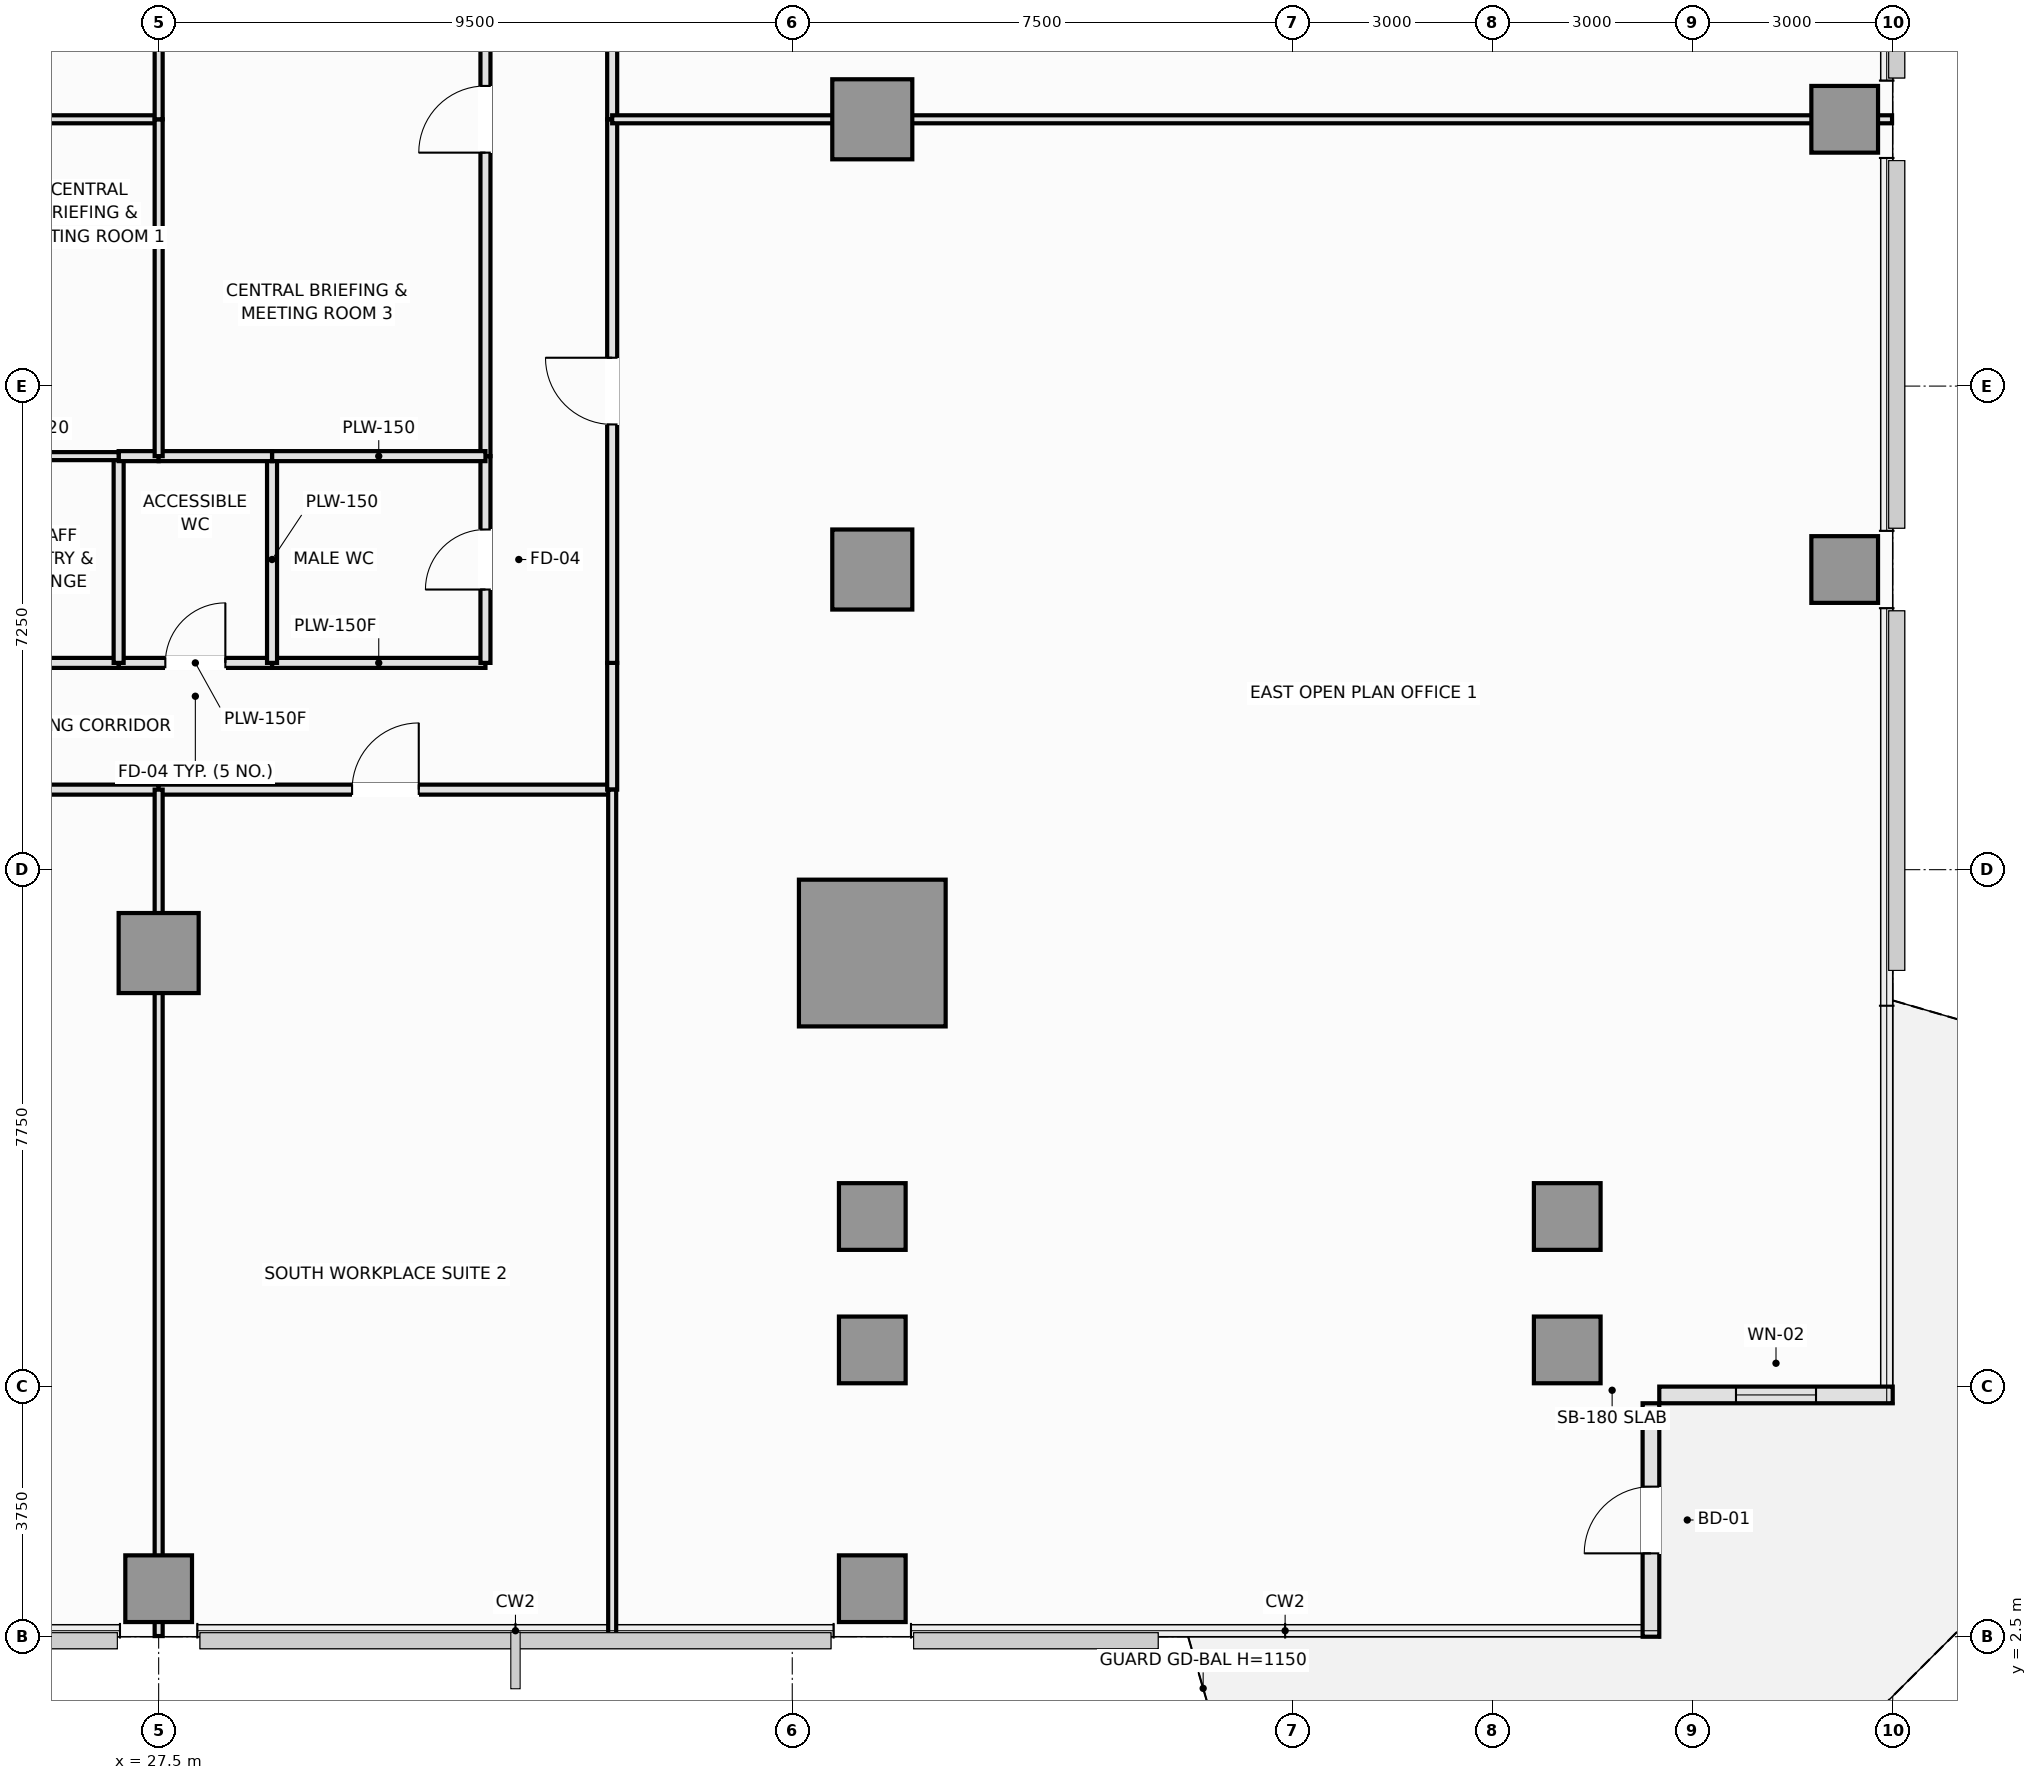
"""IFC4 building model, lengths in metres.
Left out: names, types, materials, properties, quantities, classifications, styles, units other than length and angle.
Written with IfcOpenShell. Run it as: python <this file> out.ifc"""

import sys

from ifc_helpers import new_model, si_unit, direction, frame, frame_2d, origin, origin_2d, place, context, subcontext, project, spatial, rectangle, extrude, element, fill, save


model = new_model("IFC4")
c1 = context("Model", 3, precision=1e-05, world=origin(), true_north=direction((0.0, 1.0)))
c2 = subcontext(c1, "Body", "Model", "MODEL_VIEW")
j1 = project(units=[si_unit("LENGTHUNIT", "METRE"), si_unit("PLANEANGLEUNIT", "RADIAN")], contexts=[c1])
p1 = place(None, origin())
s1 = spatial("IfcSite", under=j1, at=p1, CompositionType="ELEMENT")
p2 = place(p1, origin())
s2 = spatial("IfcBuilding", under=s1, at=p2, CompositionType="ELEMENT")
p3 = place(p2, frame((0.0, 0.0, 36.25)))
s3 = spatial("IfcBuildingStorey", under=s2, at=p3, CompositionType="ELEMENT", Elevation=36.25)
p4 = place(p3, frame((38.2, 12.75, 0.0), z_axis=(0.0, 0.0, 1.0), x_axis=(1.0, 0.0, 0.0)))
e1 = element("IfcColumn", 1, at=p4, inside=s3, PredefinedType="COLUMN", context=c2, shape_type="SweptSolid", body=[
    extrude(rectangle(XDim=2.2, YDim=2.2, at=origin_2d()), origin(), (0.0, 0.0, 1.0), 3.55),
])
for number, where, z_axis, x_axis in (
    (2, (27.5, 12.75, 0.0), (0.0, 0.0, 1.0), (1.0, 0.0, 0.0)),
    (3, (38.2, 18.5, 0.0), (0.0, 0.0, 1.0), (1.0, 0.0, 0.0)),
    (4, (38.2, 25.25, 0.0), (0.0, 0.0, 1.0), (1.0, 0.0, 0.0)),
):
    element("IfcColumn", number, at=place(p3, frame(where, z_axis=z_axis, x_axis=x_axis)), inside=s3, PredefinedType="COLUMN", context=c2, shape_type="SweptSolid", body=[
        extrude(rectangle(XDim=1.2, YDim=1.2, at=origin_2d()), origin(), (0.0, 0.0, 1.0), 3.55),
    ])
for number, where, z_axis, x_axis in (
    (5, (48.62, 6.8, 0.0), (0.0, 0.0, 1.0), (1.0, 0.0, 0.0)),
    (6, (38.2, 6.8, 0.0), (0.0, 0.0, 1.0), (1.0, 0.0, 0.0)),
    (7, (38.2, 8.8, 0.0), (0.0, 0.0, 1.0), (1.0, 0.0, 0.0)),
    (8, (48.62, 8.8, 0.0), (0.0, 0.0, 1.0), (1.0, 0.0, 0.0)),
    (9, (52.78, 18.5, 0.0), (0.0, 0.0, 1.0), (1.0, 0.0, 0.0)),
    (10, (52.78, 25.25, 0.0), (0.0, 0.0, 1.0), (1.0, 0.0, 0.0)),
    (11, (27.5, 3.22, 0.0), (0.0, 0.0, 1.0), (1.0, 0.0, 0.0)),
    (12, (38.2, 3.22, 0.0), (0.0, 0.0, 1.0), (1.0, 0.0, 0.0)),
):
    element("IfcColumn", number, at=place(p3, frame(where, z_axis=z_axis, x_axis=x_axis)), inside=s3, PredefinedType="COLUMN", context=c2, shape_type="SweptSolid", body=[
        extrude(rectangle(XDim=1.0, YDim=1.0, at=origin_2d()), origin(), (0.0, 0.0, 1.0), 3.55),
    ])
p5 = place(p3, frame((49.875, 2.5, 0.0), z_axis=(0.0, 0.0, 1.0), x_axis=(0.0, 1.0, 0.0)))
e13 = element("IfcWall", 13, at=p5, inside=s3, PredefinedType="SOLIDWALL", context=c2, shape_type="SweptSolid", body=[
    extrude(rectangle(XDim=3.5, YDim=0.25, at=frame_2d((1.75, 0.0))), origin(), (0.0, 0.0, 1.0), 3.07),
])
p6 = place(p5, frame((1.25, 0.0, 0.0)))
e14 = element("IfcOpeningElement", 14, at=p6, cuts=e13, PredefinedType="OPENING", context=c2, shape_type="SweptSolid", body=[
    extrude(rectangle(XDim=1.0, YDim=2.2, at=frame_2d((0.5, 1.1))), frame((0.0, 0.135, 0.0), z_axis=(0.0, -1.0, 0.0), x_axis=(1.0, 0.0, 0.0)), (0.0, 0.0, 1.0), 0.27),
])
p7 = place(p3, frame((50.0, 6.125, 0.0), z_axis=(0.0, 0.0, 1.0), x_axis=(1.0, 0.0, 0.0)))
e15 = element("IfcWall", 15, at=p7, inside=s3, PredefinedType="SOLIDWALL", context=c2, shape_type="SweptSolid", body=[
    extrude(rectangle(XDim=3.5, YDim=0.25, at=frame_2d((1.75, 0.0))), origin(), (0.0, 0.0, 1.0), 3.07),
])
p8 = place(p7, frame((1.15, 0.0, 0.9)))
e16 = element("IfcOpeningElement", 16, at=p8, cuts=e15, PredefinedType="OPENING", context=c2, shape_type="SweptSolid", body=[
    extrude(rectangle(XDim=1.2, YDim=1.8, at=frame_2d((0.6, 0.9))), frame((0.0, 0.135, 0.0), z_axis=(0.0, -1.0, 0.0), x_axis=(1.0, 0.0, 0.0)), (0.0, 0.0, 1.0), 0.27),
])
p9 = place(p3, frame((29.2, 17.1, 0.0), z_axis=(0.0, 0.0, 1.0), x_axis=(1.0, 0.0, 0.0)))
e17 = element("IfcWall", 17, at=p9, inside=s3, PredefinedType="PLUMBINGWALL", context=c2, shape_type="SweptSolid", body=[
    extrude(rectangle(XDim=3.2, YDim=0.15, at=frame_2d((1.6, 0.0))), origin(), (0.0, 0.0, 1.0), 3.37),
])
p10 = place(p3, frame((26.9, 17.1, 0.0), z_axis=(0.0, 0.0, 1.0), x_axis=(1.0, 0.0, 0.0)))
e18 = element("IfcWall", 18, at=p10, inside=s3, PredefinedType="PLUMBINGWALL", context=c2, shape_type="SweptSolid", body=[
    extrude(rectangle(XDim=2.3, YDim=0.15, at=frame_2d((1.15, 0.0))), origin(), (0.0, 0.0, 1.0), 3.37),
])
p11 = place(p10, frame((0.7, 0.0, 0.0)))
e19 = element("IfcOpeningElement", 19, at=p11, cuts=e18, PredefinedType="OPENING", context=c2, shape_type="SweptSolid", body=[
    extrude(rectangle(XDim=0.9, YDim=2.1, at=frame_2d((0.45, 1.05))), frame((0.0, 0.085, 0.0), z_axis=(0.0, -1.0, 0.0), x_axis=(1.0, 0.0, 0.0)), (0.0, 0.0, 1.0), 0.17),
])
p12 = place(p3, frame((24.45, 17.1, 0.0), z_axis=(0.0, 0.0, 1.0), x_axis=(1.0, 0.0, 0.0)))
e20 = element("IfcWall", 20, at=p12, inside=s3, PredefinedType="PARTITIONING", context=c2, shape_type="SweptSolid", body=[
    extrude(rectangle(XDim=2.45, YDim=0.15, at=frame_2d((1.225, 0.0))), origin(), (0.0, 0.0, 1.0), 3.37),
])
p13 = place(p3, frame((18.0, 15.2, 0.0), z_axis=(0.0, 0.0, 1.0), x_axis=(1.0, 0.0, 0.0)))
e21 = element("IfcWall", 21, at=p13, inside=s3, PredefinedType="PARTITIONING", context=c2, shape_type="SweptSolid", body=[
    extrude(rectangle(XDim=9.5, YDim=0.15, at=frame_2d((4.75, 0.0))), origin(), (0.0, 0.0, 1.0), 3.37),
])
p14 = place(p13, frame((4.25, 0.0, 0.0)))
e22 = element("IfcOpeningElement", 22, at=p14, cuts=e21, PredefinedType="OPENING", context=c2, shape_type="SweptSolid", body=[
    extrude(rectangle(XDim=1.0, YDim=2.15, at=frame_2d((0.5, 1.075))), frame((0.0, 0.085, 0.0), z_axis=(0.0, -1.0, 0.0), x_axis=(1.0, 0.0, 0.0)), (0.0, 0.0, 1.0), 0.17),
])
p15 = place(p3, frame((27.5, 15.2, 0.0), z_axis=(0.0, 0.0, 1.0), x_axis=(1.0, 0.0, 0.0)))
e23 = element("IfcWall", 23, at=p15, inside=s3, PredefinedType="PARTITIONING", context=c2, shape_type="SweptSolid", body=[
    extrude(rectangle(XDim=6.8, YDim=0.15, at=frame_2d((3.4, 0.0))), origin(), (0.0, 0.0, 1.0), 3.37),
])
p16 = place(p15, frame((2.9, 0.0, 0.0)))
e24 = element("IfcOpeningElement", 24, at=p16, cuts=e23, PredefinedType="OPENING", context=c2, shape_type="SweptSolid", body=[
    extrude(rectangle(XDim=1.0, YDim=2.15, at=frame_2d((0.5, 1.075))), frame((0.0, 0.085, 0.0), z_axis=(0.0, -1.0, 0.0), x_axis=(1.0, 0.0, 0.0)), (0.0, 0.0, 1.0), 0.17),
])
p17 = place(p3, frame((34.3, 15.2, 0.0), z_axis=(0.0, 0.0, 1.0), x_axis=(0.0, 1.0, 0.0)))
e25 = element("IfcWall", 25, at=p17, inside=s3, PredefinedType="PARTITIONING", context=c2, shape_type="SweptSolid", body=[
    extrude(rectangle(XDim=1.9, YDim=0.15, at=frame_2d((0.95, 0.0))), origin(), (0.0, 0.0, 1.0), 3.37),
])
p18 = place(p3, frame((32.4, 17.1, 0.0), z_axis=(0.0, 0.0, 1.0), x_axis=(0.0, 1.0, 0.0)))
e26 = element("IfcWall", 26, at=p18, inside=s3, PredefinedType="PLUMBINGWALL", context=c2, shape_type="SweptSolid", body=[
    extrude(rectangle(XDim=3.1, YDim=0.15, at=frame_2d((1.55, 0.0))), origin(), (0.0, 0.0, 1.0), 3.37),
])
p19 = place(p18, frame((1.1, 0.0, 0.0)))
e27 = element("IfcOpeningElement", 27, at=p19, cuts=e26, PredefinedType="OPENING", context=c2, shape_type="SweptSolid", body=[
    extrude(rectangle(XDim=0.9, YDim=2.1, at=frame_2d((0.45, 1.05))), frame((0.0, 0.085, 0.0), z_axis=(0.0, -1.0, 0.0), x_axis=(1.0, 0.0, 0.0)), (0.0, 0.0, 1.0), 0.17),
])
p20 = place(p3, frame((32.4, 20.2, 0.0), z_axis=(0.0, 0.0, 1.0), x_axis=(0.0, 1.0, 0.0)))
e28 = element("IfcWall", 28, at=p20, inside=s3, PredefinedType="PARTITIONING", context=c2, shape_type="SweptSolid", body=[
    extrude(rectangle(XDim=10.1, YDim=0.15, at=frame_2d((5.05, 0.0))), origin(), (0.0, 0.0, 1.0), 3.37),
])
p21 = place(p20, frame((4.55, 0.0, 0.0)))
e29 = element("IfcOpeningElement", 29, at=p21, cuts=e28, PredefinedType="OPENING", context=c2, shape_type="SweptSolid", body=[
    extrude(rectangle(XDim=1.0, YDim=2.15, at=frame_2d((0.5, 1.075))), frame((0.0, 0.085, 0.0), z_axis=(0.0, -1.0, 0.0), x_axis=(1.0, 0.0, 0.0)), (0.0, 0.0, 1.0), 0.17),
])
p22 = place(p3, frame((34.3, 17.1, 0.0), z_axis=(0.0, 0.0, 1.0), x_axis=(0.0, 1.0, 0.0)))
e30 = element("IfcWall", 30, at=p22, inside=s3, PredefinedType="PARTITIONING", context=c2, shape_type="SweptSolid", body=[
    extrude(rectangle(XDim=8.15, YDim=0.15, at=frame_2d((4.075, 0.0))), origin(), (0.0, 0.0, 1.0), 3.37),
])
p23 = place(p22, frame((3.575, 0.0, 0.0)))
e31 = element("IfcOpeningElement", 31, at=p23, cuts=e30, PredefinedType="OPENING", context=c2, shape_type="SweptSolid", body=[
    extrude(rectangle(XDim=1.0, YDim=2.15, at=frame_2d((0.5, 1.075))), frame((0.0, 0.085, 0.0), z_axis=(0.0, -1.0, 0.0), x_axis=(1.0, 0.0, 0.0)), (0.0, 0.0, 1.0), 0.17),
])
p24 = place(p3, frame((34.3, 25.25, 0.0), z_axis=(0.0, 0.0, 1.0), x_axis=(0.0, 1.0, 0.0)))
e32 = element("IfcWall", 32, at=p24, inside=s3, PredefinedType="PARTITIONING", context=c2, shape_type="SweptSolid", body=[
    extrude(rectangle(XDim=8.15, YDim=0.15, at=frame_2d((4.075, 0.0))), origin(), (0.0, 0.0, 1.0), 3.37),
])
p25 = place(p24, frame((3.575, 0.0, 0.0)))
e33 = element("IfcOpeningElement", 33, at=p25, cuts=e32, PredefinedType="OPENING", context=c2, shape_type="SweptSolid", body=[
    extrude(rectangle(XDim=1.0, YDim=2.15, at=frame_2d((0.5, 1.075))), frame((0.0, 0.085, 0.0), z_axis=(0.0, -1.0, 0.0), x_axis=(1.0, 0.0, 0.0)), (0.0, 0.0, 1.0), 0.17),
])
p26 = place(p3, frame((29.2, 17.1, 0.0), z_axis=(0.0, 0.0, 1.0), x_axis=(0.0, 1.0, 0.0)))
e34 = element("IfcWall", 34, at=p26, inside=s3, PredefinedType="PLUMBINGWALL", context=c2, shape_type="SweptSolid", body=[
    extrude(rectangle(XDim=3.1, YDim=0.15, at=frame_2d((1.55, 0.0))), origin(), (0.0, 0.0, 1.0), 3.37),
])
p27 = place(p3, frame((29.2, 20.2, 0.0), z_axis=(0.0, 0.0, 1.0), x_axis=(1.0, 0.0, 0.0)))
e35 = element("IfcWall", 35, at=p27, inside=s3, PredefinedType="PLUMBINGWALL", context=c2, shape_type="SweptSolid", body=[
    extrude(rectangle(XDim=3.2, YDim=0.15, at=frame_2d((1.6, 0.0))), origin(), (0.0, 0.0, 1.0), 3.37),
])
p28 = place(p3, frame((26.9, 17.1, 0.0), z_axis=(0.0, 0.0, 1.0), x_axis=(0.0, 1.0, 0.0)))
e36 = element("IfcWall", 36, at=p28, inside=s3, PredefinedType="PLUMBINGWALL", context=c2, shape_type="SweptSolid", body=[
    extrude(rectangle(XDim=3.1, YDim=0.15, at=frame_2d((1.55, 0.0))), origin(), (0.0, 0.0, 1.0), 3.37),
])
p29 = place(p3, frame((26.9, 20.2, 0.0), z_axis=(0.0, 0.0, 1.0), x_axis=(1.0, 0.0, 0.0)))
e37 = element("IfcWall", 37, at=p29, inside=s3, PredefinedType="PLUMBINGWALL", context=c2, shape_type="SweptSolid", body=[
    extrude(rectangle(XDim=0.6, YDim=0.15, at=frame_2d((0.3, 0.0))), origin(), (0.0, 0.0, 1.0), 3.37),
])
p30 = place(p3, frame((27.5, 20.2, 0.0), z_axis=(0.0, 0.0, 1.0), x_axis=(1.0, 0.0, 0.0)))
e38 = element("IfcWall", 38, at=p30, inside=s3, PredefinedType="PLUMBINGWALL", context=c2, shape_type="SweptSolid", body=[
    extrude(rectangle(XDim=1.7, YDim=0.15, at=frame_2d((0.85, 0.0))), origin(), (0.0, 0.0, 1.0), 3.37),
])
p31 = place(p3, frame((24.45, 20.2, 0.0), z_axis=(0.0, 0.0, 1.0), x_axis=(1.0, 0.0, 0.0)))
e39 = element("IfcWall", 39, at=p31, inside=s3, PredefinedType="PARTITIONING", context=c2, shape_type="SweptSolid", body=[
    extrude(rectangle(XDim=2.45, YDim=0.12, at=frame_2d((1.225, 0.0))), origin(), (0.0, 0.0, 1.0), 3.37),
])
p32 = place(p3, frame((24.45, 25.25, 0.0), z_axis=(0.0, 0.0, 1.0), x_axis=(1.0, 0.0, 0.0)))
e40 = element("IfcWall", 40, at=p32, inside=s3, PredefinedType="PARTITIONING", context=c2, shape_type="SweptSolid", body=[
    extrude(rectangle(XDim=3.05, YDim=0.12, at=frame_2d((1.525, 0.0))), origin(), (0.0, 0.0, 1.0), 2.72),
])
for number, where, z_axis, x_axis in (
    (41, (27.5, 20.2, 0.0), (0.0, 0.0, 1.0), (0.0, 1.0, 0.0)),
    (42, (27.5, 25.25, 0.0), (0.0, 0.0, 1.0), (0.0, 1.0, 0.0)),
):
    element("IfcWall", number, at=place(p3, frame(where, z_axis=z_axis, x_axis=x_axis)), inside=s3, PredefinedType="PARTITIONING", context=c2, shape_type="SweptSolid", body=[
        extrude(rectangle(XDim=5.05, YDim=0.12, at=frame_2d((2.525, 0.0))), origin(), (0.0, 0.0, 1.0), 3.37),
    ])
p33 = place(p3, frame((27.5, 2.51, 0.0), z_axis=(0.0, 0.0, 1.0), x_axis=(0.0, 1.0, 0.0)))
e43 = element("IfcWall", 43, at=p33, inside=s3, PredefinedType="PARTITIONING", context=c2, shape_type="SweptSolid", body=[
    extrude(rectangle(XDim=12.69, YDim=0.12, at=frame_2d((6.345, 0.0))), origin(), (0.0, 0.0, 1.0), 2.82),
])
p34 = place(p3, frame((34.3, 2.51, 0.0), z_axis=(0.0, 0.0, 1.0), x_axis=(0.0, 1.0, 0.0)))
e44 = element("IfcWall", 44, at=p34, inside=s3, PredefinedType="PARTITIONING", context=c2, shape_type="SweptSolid", body=[
    extrude(rectangle(XDim=12.69, YDim=0.12, at=frame_2d((6.345, 0.0))), origin(), (0.0, 0.0, 1.0), 3.37),
])
p35 = place(p3, frame((34.3, 25.25, 0.0), z_axis=(0.0, 0.0, 1.0), x_axis=(1.0, 0.0, 0.0)))
e45 = element("IfcWall", 45, at=p35, inside=s3, PredefinedType="PARTITIONING", context=c2, shape_type="SweptSolid", body=[
    extrude(rectangle(XDim=19.19, YDim=0.12, at=frame_2d((9.595, 0.0))), origin(), (0.0, 0.0, 1.0), 2.72),
])
p36 = place(p6, frame((1.0, 0.0, 0.0), z_axis=(0.0, 0.0, 1.0), x_axis=(-1.0, 0.0, 0.0)))
e46 = element("IfcDoor", 46, at=p36, inside=s3, OperationType="SINGLE_SWING_LEFT", PredefinedType="DOOR", context=c2, shape_type="SweptSolid", body=[
    extrude(rectangle(XDim=1.0, YDim=2.2, at=frame_2d((0.5, 1.1))), frame((0.0, 0.025, 0.0), z_axis=(0.0, -1.0, 0.0), x_axis=(1.0, 0.0, 0.0)), (0.0, 0.0, 1.0), 0.05),
])
fill(e14, e46)
p37 = place(p8, origin())
e47 = element("IfcWindow", 47, at=p37, inside=s3, PartitioningType="SINGLE_PANEL", PredefinedType="WINDOW", context=c2, shape_type="SweptSolid", body=[
    extrude(rectangle(XDim=1.2, YDim=1.8, at=frame_2d((0.6, 0.9))), frame((0.0, 0.03, 0.0), z_axis=(0.0, -1.0, 0.0), x_axis=(1.0, 0.0, 0.0)), (0.0, 0.0, 1.0), 0.06),
])
fill(e16, e47)
p38 = place(p11, origin())
e48 = element("IfcDoor", 48, at=p38, inside=s3, OperationType="SINGLE_SWING_RIGHT", PredefinedType="DOOR", context=c2, shape_type="SweptSolid", body=[
    extrude(rectangle(XDim=0.9, YDim=2.1, at=frame_2d((0.45, 1.05))), frame((0.0, 0.025, 0.0), z_axis=(0.0, -1.0, 0.0), x_axis=(1.0, 0.0, 0.0)), (0.0, 0.0, 1.0), 0.05),
])
fill(e19, e48)
p39 = place(p16, origin())
e49 = element("IfcDoor", 49, at=p39, inside=s3, OperationType="SINGLE_SWING_RIGHT", PredefinedType="DOOR", context=c2, shape_type="SweptSolid", body=[
    extrude(rectangle(XDim=1.0, YDim=2.15, at=frame_2d((0.5, 1.075))), frame((0.0, 0.025, 0.0), z_axis=(0.0, -1.0, 0.0), x_axis=(1.0, 0.0, 0.0)), (0.0, 0.0, 1.0), 0.05),
])
fill(e24, e49)
p40 = place(p19, origin())
e50 = element("IfcDoor", 50, at=p40, inside=s3, OperationType="SINGLE_SWING_LEFT", PredefinedType="DOOR", context=c2, shape_type="SweptSolid", body=[
    extrude(rectangle(XDim=0.9, YDim=2.1, at=frame_2d((0.45, 1.05))), frame((0.0, 0.025, 0.0), z_axis=(0.0, -1.0, 0.0), x_axis=(1.0, 0.0, 0.0)), (0.0, 0.0, 1.0), 0.05),
])
fill(e27, e50)
p41 = place(p21, origin())
e51 = element("IfcDoor", 51, at=p41, inside=s3, OperationType="SINGLE_SWING_LEFT", PredefinedType="DOOR", context=c2, shape_type="SweptSolid", body=[
    extrude(rectangle(XDim=1.0, YDim=2.15, at=frame_2d((0.5, 1.075))), frame((0.0, 0.025, 0.0), z_axis=(0.0, -1.0, 0.0), x_axis=(1.0, 0.0, 0.0)), (0.0, 0.0, 1.0), 0.05),
])
fill(e29, e51)
p42 = place(p23, origin())
e52 = element("IfcDoor", 52, at=p42, inside=s3, OperationType="SINGLE_SWING_RIGHT", PredefinedType="DOOR", context=c2, shape_type="SweptSolid", body=[
    extrude(rectangle(XDim=1.0, YDim=2.15, at=frame_2d((0.5, 1.075))), frame((0.0, 0.025, 0.0), z_axis=(0.0, -1.0, 0.0), x_axis=(1.0, 0.0, 0.0)), (0.0, 0.0, 1.0), 0.05),
])
fill(e31, e52)
save(model, sys.argv[1])
